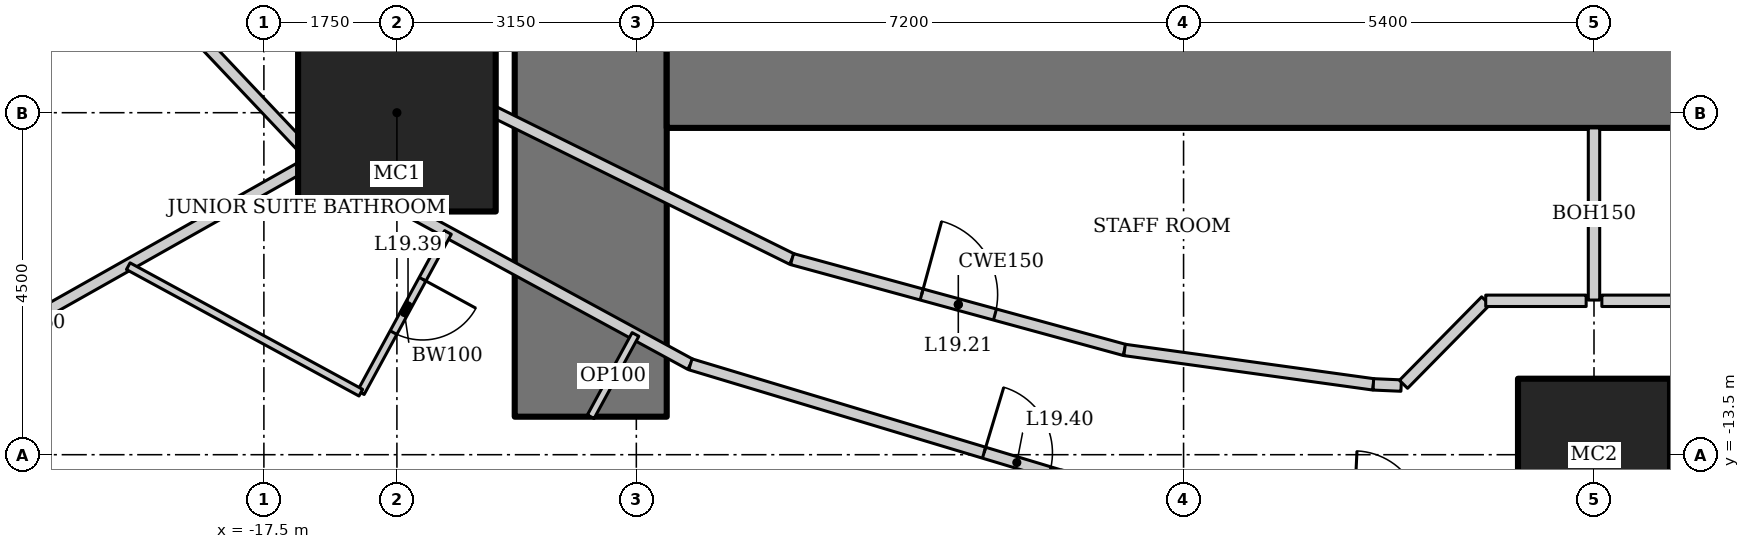
"""IFC4 building model, lengths in metres.
Left out: names, types, materials, properties, quantities, classifications, styles, units other than length and angle.
Written with IfcOpenShell. Run it as: python <this file> out.ifc"""

import sys

from ifc_helpers import new_model, si_unit, direction, frame, frame_2d, origin, origin_2d, place, context, subcontext, project, spatial, rectangle, hollow_rectangle, extrude, element, fill, save


model = new_model("IFC4")
c1 = context("Model", 3, precision=1e-05, world=origin(), true_north=direction((0.0, 1.0)))
c2 = subcontext(c1, "Body", "Model", "MODEL_VIEW")
j1 = project(units=[si_unit("LENGTHUNIT", "METRE"), si_unit("PLANEANGLEUNIT", "RADIAN")], contexts=[c1])
p1 = place(None, origin())
s1 = spatial("IfcSite", under=j1, at=p1, CompositionType="ELEMENT")
p2 = place(p1, origin())
s2 = spatial("IfcBuilding", under=s1, at=p2, CompositionType="ELEMENT")
p3 = place(p2, frame((0.0, 0.0, 83.8)))
s3 = spatial("IfcBuildingStorey", under=s2, at=p3, CompositionType="ELEMENT", Elevation=83.8)
p4 = place(p3, frame((-15.75, -9.0, 0.0), z_axis=(0.0, 0.0, 1.0), x_axis=(1.0, 0.0, 0.0)))
e1 = element("IfcColumn", 1, at=p4, inside=s3, PredefinedType="COLUMN", context=c2, shape_type="SweptSolid", body=[
    extrude(hollow_rectangle(XDim=2.6, YDim=2.6, WallThickness=0.13, at=origin_2d()), origin(), (0.0, 0.0, 1.0), 3.6),
])
p5 = place(p3, frame((0.0, -13.5, 0.0), z_axis=(0.0, 0.0, 1.0), x_axis=(1.0, 0.0, 0.0)))
e2 = element("IfcColumn", 2, at=p5, inside=s3, PredefinedType="COLUMN", context=c2, shape_type="SweptSolid", body=[
    extrude(hollow_rectangle(XDim=2.0, YDim=2.0, WallThickness=0.17, at=origin_2d()), origin(), (0.0, 0.0, 1.0), 3.6),
])
p6 = place(p3, frame((-13.2, 13.0, 0.0), z_axis=(0.0, 0.0, 1.0), x_axis=(0.0, -1.0, 0.0)))
e3 = element("IfcWall", 3, at=p6, inside=s3, PredefinedType="SHEAR", context=c2, shape_type="SweptSolid", body=[
    extrude(rectangle(XDim=26.0, YDim=2.0, at=frame_2d((13.0, 0.0))), origin(), (0.0, 0.0, 1.0), 3.6),
])
p7 = place(p6, frame((12.1, 0.0, 0.0)))
e4 = element("IfcOpeningElement", 4, at=p7, cuts=e3, PredefinedType="OPENING", context=c2, shape_type="SweptSolid", body=[
    extrude(rectangle(XDim=1.8, YDim=2.1, at=frame_2d((0.9, 1.05))), frame((0.0, 1.01, 0.0), z_axis=(0.0, -1.0, 0.0), x_axis=(1.0, 0.0, 0.0)), (0.0, 0.0, 1.0), 2.02),
])
p8 = place(p3, frame((-12.2, -8.0, 0.0), z_axis=(0.0, 0.0, 1.0), x_axis=(1.0, 0.0, 0.0)))
e5 = element("IfcWall", 5, at=p8, inside=s3, PredefinedType="SHEAR", context=c2, shape_type="SweptSolid", body=[
    extrude(rectangle(XDim=24.4, YDim=2.4, at=frame_2d((12.2, 0.0))), origin(), (0.0, 0.0, 1.0), 3.6),
])
p9 = place(p3, frame((-24.435, -13.909, 0.0), z_axis=(0.0, 0.0, 1.0), x_axis=(0.87090601027, 0.491449612143, 0.0)))
e6 = element("IfcWall", 6, at=p9, inside=s3, PredefinedType="PARTITIONING", context=c2, shape_type="SweptSolid", body=[
    extrude(rectangle(XDim=8.726, YDim=0.15, at=frame_2d((4.363, 0.0))), origin(), (0.0, 0.0, 1.0), 2.693),
])
p10 = place(p3, frame((-20.984, -5.232, 0.0), z_axis=(0.0, 0.0, 1.0), x_axis=(0.687062608696, -0.726598218916, 0.0)))
e7 = element("IfcWall", 7, at=p10, inside=s3, PredefinedType="PARTITIONING", context=c2, shape_type="SweptSolid", body=[
    extrude(rectangle(XDim=6.039, YDim=0.15, at=frame_2d((3.02, 0.0))), origin(), (0.0, 0.0, 1.0), 3.45),
])
p11 = place(p10, frame((0.15, 0.0, 0.0)))
e8 = element("IfcOpeningElement", 8, at=p11, cuts=e7, PredefinedType="OPENING", context=c2, shape_type="SweptSolid", body=[
    extrude(rectangle(XDim=0.9, YDim=2.1, at=frame_2d((0.45, 1.05))), frame((0.0, 0.085, 0.0), z_axis=(0.0, -1.0, 0.0), x_axis=(1.0, 0.0, 0.0)), (0.0, 0.0, 1.0), 0.17),
])
p12 = place(p3, frame((-16.835, -9.62, 0.0), z_axis=(0.0, 0.0, 1.0), x_axis=(0.878450059298, -0.477834169267, 0.0)))
e9 = element("IfcWall", 9, at=p12, inside=s3, PredefinedType="PARTITIONING", context=c2, shape_type="SweptSolid", body=[
    extrude(rectangle(XDim=5.631, YDim=0.15, at=frame_2d((2.815, 0.0))), origin(), (0.0, 0.0, 1.0), 3.45),
])
p13 = place(p3, frame((-11.888, -12.311, 0.0), z_axis=(0.0, 0.0, 1.0), x_axis=(0.957564241242, -0.288219922793, 0.0)))
e10 = element("IfcWall", 10, at=p13, inside=s3, PredefinedType="PARTITIONING", context=c2, shape_type="SweptSolid", body=[
    extrude(rectangle(XDim=5.085, YDim=0.15, at=frame_2d((2.542, 0.0))), origin(), (0.0, 0.0, 1.0), 3.45),
])
p14 = place(p13, frame((4.035, 0.0, 0.0)))
e11 = element("IfcOpeningElement", 11, at=p14, cuts=e10, PredefinedType="OPENING", context=c2, shape_type="SweptSolid", body=[
    extrude(rectangle(XDim=0.9, YDim=2.1, at=frame_2d((0.45, 1.05))), frame((0.0, 0.085, 0.0), z_axis=(0.0, -1.0, 0.0), x_axis=(1.0, 0.0, 0.0)), (0.0, 0.0, 1.0), 0.17),
])
p15 = place(p3, frame((-19.177, -4.781, 0.0), z_axis=(0.0, 0.0, 1.0), x_axis=(0.720837261072, -0.693104352209, 0.0)))
e12 = element("IfcWall", 12, at=p15, inside=s3, PredefinedType="PARTITIONING", context=c2, shape_type="SweptSolid", body=[
    extrude(rectangle(XDim=5.59, YDim=0.15, at=frame_2d((2.795, 0.0))), origin(), (0.0, 0.0, 1.0), 3.45),
])
p16 = place(p15, frame((2.295, 0.0, 0.0)))
e13 = element("IfcOpeningElement", 13, at=p16, cuts=e12, PredefinedType="OPENING", context=c2, shape_type="SweptSolid", body=[
    extrude(rectangle(XDim=1.0, YDim=2.1, at=frame_2d((0.5, 1.05))), frame((0.0, 0.085, 0.0), z_axis=(0.0, -1.0, 0.0), x_axis=(1.0, 0.0, 0.0)), (0.0, 0.0, 1.0), 0.17),
])
p17 = place(p3, frame((-15.147, -8.656, 0.0), z_axis=(0.0, 0.0, 1.0), x_axis=(0.89656943448, -0.442903205177, 0.0)))
e14 = element("IfcWall", 14, at=p17, inside=s3, PredefinedType="PARTITIONING", context=c2, shape_type="SweptSolid", body=[
    extrude(rectangle(XDim=5.126, YDim=0.15, at=frame_2d((2.563, 0.0))), origin(), (0.0, 0.0, 1.0), 3.45),
])
p18 = place(p3, frame((-10.551, -10.926, 0.0), z_axis=(0.0, 0.0, 1.0), x_axis=(0.964644466646, -0.263554648923, 0.0)))
e15 = element("IfcWall", 15, at=p18, inside=s3, PredefinedType="PARTITIONING", context=c2, shape_type="SweptSolid", body=[
    extrude(rectangle(XDim=4.535, YDim=0.15, at=frame_2d((2.268, 0.0))), origin(), (0.0, 0.0, 1.0), 3.45),
])
p19 = place(p18, frame((1.768, 0.0, 0.0)))
e16 = element("IfcOpeningElement", 16, at=p19, cuts=e15, PredefinedType="OPENING", context=c2, shape_type="SweptSolid", body=[
    extrude(rectangle(XDim=1.0, YDim=2.1, at=frame_2d((0.5, 1.05))), frame((0.0, 0.085, 0.0), z_axis=(0.0, -1.0, 0.0), x_axis=(1.0, 0.0, 0.0)), (0.0, 0.0, 1.0), 0.17),
])
p20 = place(p3, frame((-6.176, -12.122, 0.0), z_axis=(0.0, 0.0, 1.0), x_axis=(0.990563451353, -0.137054911782, 0.0)))
e17 = element("IfcWall", 17, at=p20, inside=s3, PredefinedType="PARTITIONING", context=c2, shape_type="SweptSolid", body=[
    extrude(rectangle(XDim=3.304, YDim=0.15, at=frame_2d((1.652, 0.0))), origin(), (0.0, 0.0, 1.0), 3.45),
])
p21 = place(p3, frame((-15.078, -10.576, 0.0), z_axis=(0.0, 0.0, 1.0), x_axis=(-0.477832549678, -0.878450940274, 0.0)))
e18 = element("IfcWall", 18, at=p21, inside=s3, PredefinedType="PARTITIONING", context=c2, shape_type="SweptSolid", body=[
    extrude(rectangle(XDim=2.4, YDim=0.1, at=frame_2d((1.2, 0.0))), origin(), (0.0, 0.0, 1.0), 3.45),
])
p22 = place(p21, frame((0.7, 0.0, 0.0)))
e19 = element("IfcOpeningElement", 19, at=p22, cuts=e18, PredefinedType="OPENING", context=c2, shape_type="SweptSolid", body=[
    extrude(rectangle(XDim=0.8, YDim=2.1, at=frame_2d((0.4, 1.05))), frame((0.0, 0.06, 0.0), z_axis=(0.0, -1.0, 0.0), x_axis=(1.0, 0.0, 0.0)), (0.0, 0.0, 1.0), 0.12),
])
p23 = place(p3, frame((-16.225, -12.684, 0.0), z_axis=(0.0, 0.0, 1.0), x_axis=(-0.878473578893, 0.477790928322, 0.0)))
e20 = element("IfcWall", 20, at=p23, inside=s3, PredefinedType="PARTITIONING", context=c2, shape_type="SweptSolid", body=[
    extrude(rectangle(XDim=3.483, YDim=0.1, at=frame_2d((1.741, 0.0))), origin(), (0.0, 0.0, 1.0), 3.45),
])
p24 = place(p3, frame((-13.2, -13.0, 0.0), z_axis=(0.0, 0.0, 1.0), x_axis=(0.477852414256, 0.878440134665, 0.0)))
e21 = element("IfcWall", 21, at=p24, inside=s3, PredefinedType="PARTITIONING", context=c2, shape_type="SweptSolid", body=[
    extrude(rectangle(XDim=1.232, YDim=0.1, at=frame_2d((0.616, 0.0))), origin(), (0.0, 0.0, 1.0), 3.45),
])
p25 = place(p3, frame((-2.903, -12.574, 0.0), z_axis=(0.0, 0.0, 1.0), x_axis=(0.999061181733, -0.04332153223, 0.0)))
e22 = element("IfcWall", 22, at=p25, inside=s3, PredefinedType="PARTITIONING", context=c2, shape_type="SweptSolid", body=[
    extrude(rectangle(XDim=0.366, YDim=0.15, at=frame_2d((0.183, 0.0))), origin(), (0.0, 0.0, 1.0), 3.45),
])
p26 = place(p3, frame((0.0, -9.2, 0.0), z_axis=(0.0, 0.0, 1.0), x_axis=(0.0, -1.0, 0.0)))
e23 = element("IfcWall", 23, at=p26, inside=s3, PredefinedType="PARTITIONING", context=c2, shape_type="SweptSolid", body=[
    extrude(rectangle(XDim=2.265, YDim=0.15, at=frame_2d((1.133, 0.0))), origin(), (0.0, 0.0, 1.0), 3.043),
])
p27 = place(p3, frame((-2.506, -12.574, 0.0), z_axis=(0.0, 0.0, 1.0), x_axis=(0.701622806479, 0.712548550927, 0.0)))
e24 = element("IfcWall", 24, at=p27, inside=s3, PredefinedType="PARTITIONING", context=c2, shape_type="SweptSolid", body=[
    extrude(rectangle(XDim=1.542, YDim=0.15, at=frame_2d((0.771, 0.0))), origin(), (0.0, 0.0, 1.0), 3.45),
])
for number, where, z_axis, x_axis in (
    (25, (-1.425, -11.475, 0.0), (0.0, 0.0, 1.0), (1.0, 0.0, 0.0)),
    (26, (0.103, -11.475, 0.0), (0.0, 0.0, 1.0), (1.0, 0.0, 0.0)),
):
    element("IfcWall", number, at=place(p3, frame(where, z_axis=z_axis, x_axis=x_axis)), inside=s3, PredefinedType="PARTITIONING", context=c2, shape_type="SweptSolid", body=[
        extrude(rectangle(XDim=1.321, YDim=0.15, at=frame_2d((0.661, 0.0))), origin(), (0.0, 0.0, 1.0), 3.45),
    ])
p28 = place(p19, origin())
e27 = element("IfcDoor", 27, at=p28, inside=s3, OperationType="SINGLE_SWING_LEFT", PredefinedType="DOOR", context=c2, shape_type="SweptSolid", body=[
    extrude(rectangle(XDim=1.0, YDim=2.1, at=frame_2d((0.5, 1.05))), frame((0.0, 0.025, 0.0), z_axis=(0.0, -1.0, 0.0), x_axis=(1.0, 0.0, 0.0)), (0.0, 0.0, 1.0), 0.05),
])
fill(e16, e27)
p29 = place(p22, origin())
e28 = element("IfcDoor", 28, at=p29, inside=s3, OperationType="SINGLE_SWING_LEFT", PredefinedType="DOOR", context=c2, shape_type="SweptSolid", body=[
    extrude(rectangle(XDim=0.8, YDim=2.1, at=frame_2d((0.4, 1.05))), frame((0.0, 0.025, 0.0), z_axis=(0.0, -1.0, 0.0), x_axis=(1.0, 0.0, 0.0)), (0.0, 0.0, 1.0), 0.05),
])
fill(e19, e28)
p30 = place(p14, origin())
e29 = element("IfcDoor", 29, at=p30, inside=s3, OperationType="SINGLE_SWING_LEFT", PredefinedType="DOOR", context=c2, shape_type="SweptSolid", body=[
    extrude(rectangle(XDim=0.9, YDim=2.1, at=frame_2d((0.45, 1.05))), frame((0.0, 0.025, 0.0), z_axis=(0.0, -1.0, 0.0), x_axis=(1.0, 0.0, 0.0)), (0.0, 0.0, 1.0), 0.05),
])
fill(e11, e29)
save(model, sys.argv[1])
